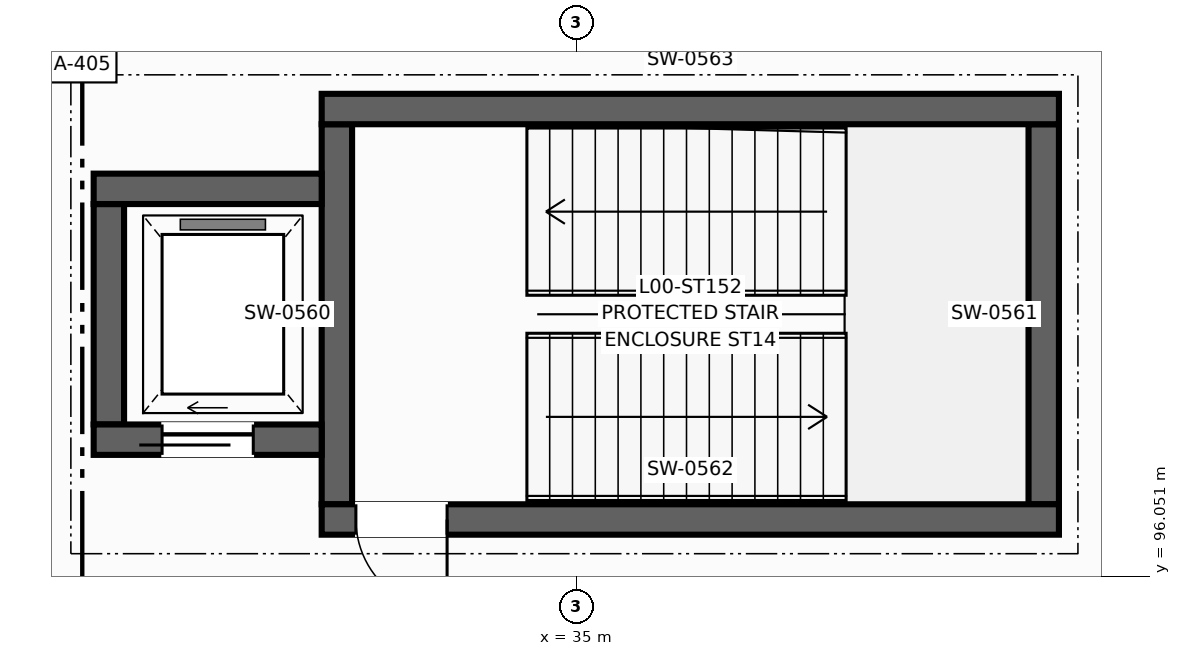
"""IFC4 building model, lengths in metres.
Left out: names, types, materials, properties, quantities, classifications, styles, units other than length and angle.
Written with IfcOpenShell. Run it as: python <this file> out.ifc"""

import sys

from ifc_helpers import new_model, si_unit, direction, frame, frame_2d, origin, place, context, subcontext, project, spatial, rectangle, extrude, element, fill, save


model = new_model("IFC4")
c1 = context("Model", 3, precision=1e-05, world=origin(), true_north=direction((0.0, 1.0)))
c2 = subcontext(c1, "Body", "Model", "MODEL_VIEW")
j1 = project(units=[si_unit("LENGTHUNIT", "METRE"), si_unit("PLANEANGLEUNIT", "RADIAN")], contexts=[c1])
p1 = place(None, origin())
s1 = spatial("IfcSite", under=j1, at=p1, CompositionType="ELEMENT")
p2 = place(p1, origin())
s2 = spatial("IfcBuilding", under=s1, at=p2, CompositionType="ELEMENT")
p3 = place(p2, origin())
s3 = spatial("IfcBuildingStorey", under=s2, at=p3, CompositionType="ELEMENT", Elevation=0.0)
for number, where, z_axis, x_axis in (
    (1, (31.85, 97.0, 0.0), (0.0, 0.0, 1.0), (0.0, 1.0, 0.0)),
    (2, (41.15, 97.0, 0.0), (0.0, 0.0, 1.0), (0.0, 1.0, 0.0)),
):
    element("IfcWall", number, at=place(p3, frame(where, z_axis=z_axis, x_axis=x_axis)), inside=s3, PredefinedType="SHEAR", context=c2, shape_type="SweptSolid", body=[
        extrude(rectangle(XDim=5.0, YDim=0.4, at=frame_2d((2.5, 0.0))), origin(), (0.0, 0.0, 1.0), 4.29),
    ])
p4 = place(p3, frame((31.65, 96.8, 0.0), z_axis=(0.0, 0.0, 1.0), x_axis=(1.0, 0.0, 0.0)))
e3 = element("IfcWall", 3, at=p4, inside=s3, PredefinedType="SHEAR", context=c2, shape_type="SweptSolid", body=[
    extrude(rectangle(XDim=9.7, YDim=0.4, at=frame_2d((4.85, 0.0))), origin(), (0.0, 0.0, 1.0), 4.29),
])
p5 = place(p4, frame((0.45, 0.0, 0.0)))
e4 = element("IfcOpeningElement", 4, at=p5, cuts=e3, PredefinedType="OPENING", context=c2, shape_type="SweptSolid", body=[
    extrude(rectangle(XDim=1.2, YDim=2.2, at=frame_2d((0.6, 1.1))), frame((0.0, 0.21, 0.0), z_axis=(0.0, -1.0, 0.0), x_axis=(1.0, 0.0, 0.0)), (0.0, 0.0, 1.0), 0.42),
])
p6 = place(p3, frame((31.65, 102.2, 0.0), z_axis=(0.0, 0.0, 1.0), x_axis=(1.0, 0.0, 0.0)))
e5 = element("IfcWall", 5, at=p6, inside=s3, PredefinedType="SHEAR", context=c2, shape_type="SweptSolid", body=[
    extrude(rectangle(XDim=9.7, YDim=0.4, at=frame_2d((4.85, 0.0))), origin(), (0.0, 0.0, 1.0), 4.29),
])
p7 = place(p3, frame((28.85, 98.05, 0.0), z_axis=(0.0, 0.0, 1.0), x_axis=(0.0, 1.0, 0.0)))
e6 = element("IfcWall", 6, at=p7, inside=s3, PredefinedType="SHEAR", context=c2, shape_type="SweptSolid", body=[
    extrude(rectangle(XDim=2.9, YDim=0.4, at=frame_2d((1.45, 0.0))), origin(), (0.0, 0.0, 1.0), 4.29),
])
p8 = place(p3, frame((28.65, 97.85, 0.0), z_axis=(0.0, 0.0, 1.0), x_axis=(1.0, 0.0, 0.0)))
e7 = element("IfcWall", 7, at=p8, inside=s3, PredefinedType="SHEAR", context=c2, shape_type="SweptSolid", body=[
    extrude(rectangle(XDim=3.0, YDim=0.4, at=frame_2d((1.5, 0.0))), origin(), (0.0, 0.0, 1.0), 4.29),
])
p9 = place(p8, frame((0.9, 0.0, 0.0)))
e8 = element("IfcOpeningElement", 8, at=p9, cuts=e7, PredefinedType="OPENING", context=c2, shape_type="SweptSolid", body=[
    extrude(rectangle(XDim=1.2, YDim=2.2, at=frame_2d((0.6, 1.1))), frame((0.0, 0.21, 0.0), z_axis=(0.0, -1.0, 0.0), x_axis=(1.0, 0.0, 0.0)), (0.0, 0.0, 1.0), 0.42),
])
p10 = place(p3, frame((28.65, 101.15, 0.0), z_axis=(0.0, 0.0, 1.0), x_axis=(1.0, 0.0, 0.0)))
e9 = element("IfcWall", 9, at=p10, inside=s3, PredefinedType="SHEAR", context=c2, shape_type="SweptSolid", body=[
    extrude(rectangle(XDim=3.0, YDim=0.4, at=frame_2d((1.5, 0.0))), origin(), (0.0, 0.0, 1.0), 4.29),
])
p11 = place(p5, frame((1.2, 0.0, 0.0), z_axis=(0.0, 0.0, 1.0), x_axis=(-1.0, 0.0, 0.0)))
e10 = element("IfcDoor", 10, at=p11, inside=s3, OperationType="SINGLE_SWING_RIGHT", PredefinedType="DOOR", context=c2, shape_type="SweptSolid", body=[
    extrude(rectangle(XDim=1.2, YDim=2.2, at=frame_2d((0.6, 1.1))), frame((0.0, 0.025, 0.0), z_axis=(0.0, -1.0, 0.0), x_axis=(1.0, 0.0, 0.0)), (0.0, 0.0, 1.0), 0.05),
])
fill(e4, e10)
p12 = place(p9, origin())
e11 = element("IfcDoor", 11, at=p12, inside=s3, OperationType="SLIDING_TO_LEFT", PredefinedType="DOOR", context=c2, shape_type="SweptSolid", body=[
    extrude(rectangle(XDim=1.2, YDim=2.2, at=frame_2d((0.6, 1.1))), frame((0.0, 0.025, 0.0), z_axis=(0.0, -1.0, 0.0), x_axis=(1.0, 0.0, 0.0)), (0.0, 0.0, 1.0), 0.05),
])
fill(e8, e11)
save(model, sys.argv[1])
